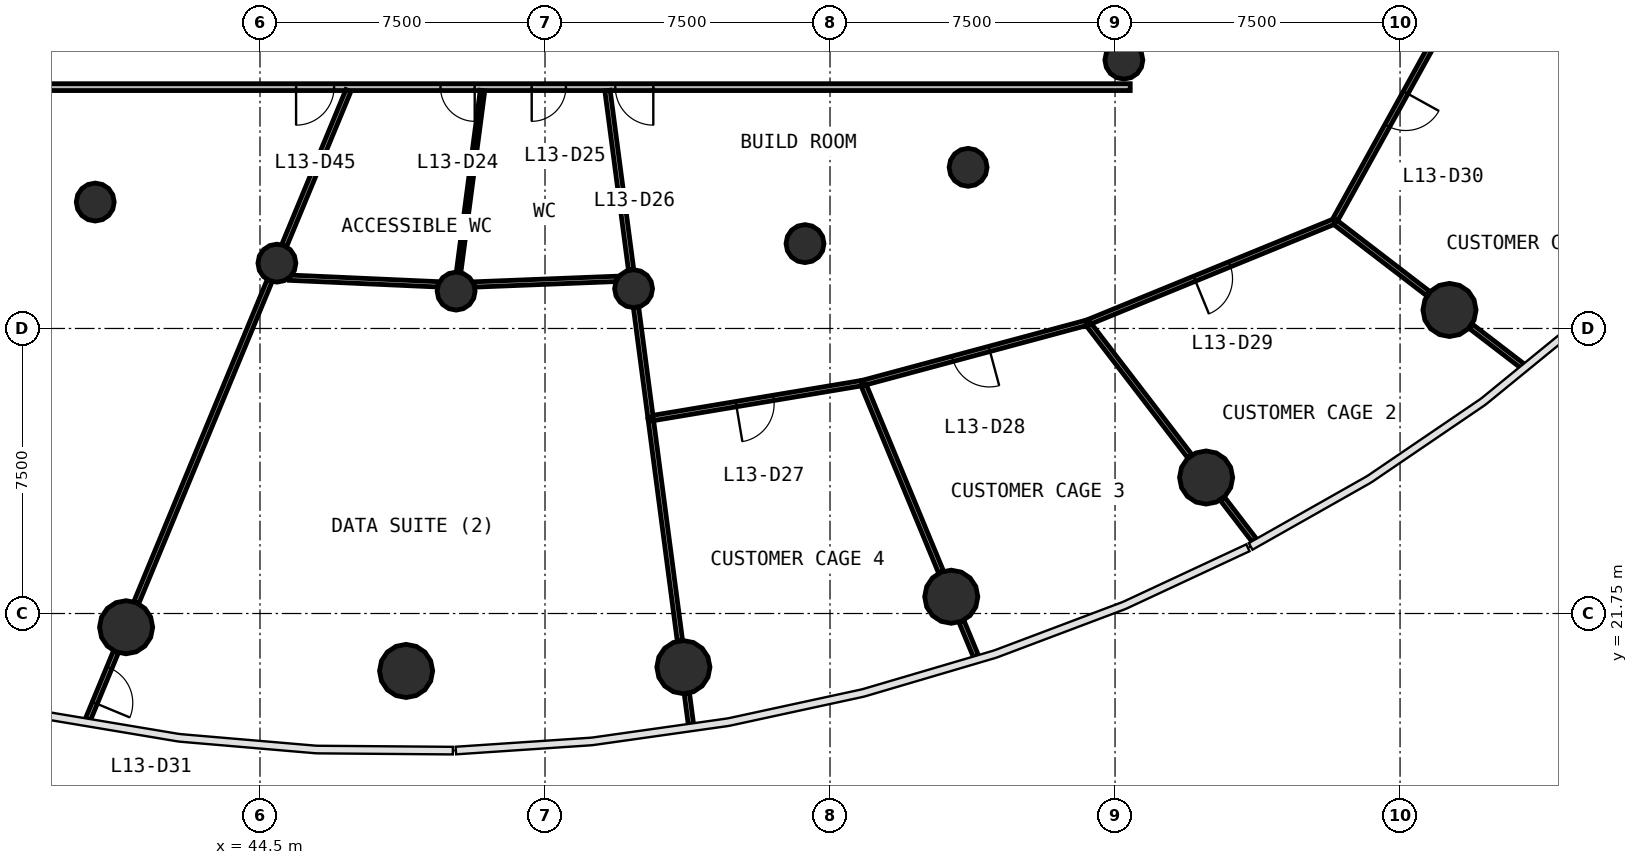
"""IFC4 building model, lengths in metres.
Left out: names, types, materials, properties, quantities, classifications, styles, units other than length and angle.
Written with IfcOpenShell. Run it as: python <this file> out.ifc"""

import sys

from ifc_helpers import new_model, si_unit, direction, frame, frame_2d, origin, origin_2d, place, context, subcontext, project, spatial, rectangle, circle, extrude, source, transform, mapped, element, fill, save


model = new_model("IFC4")
c1 = context("Model", 3, precision=1e-05, world=origin(), true_north=direction((0.0, 1.0)))
c2 = subcontext(c1, "Body", "Model", "MODEL_VIEW")
j1 = project(units=[si_unit("LENGTHUNIT", "METRE"), si_unit("PLANEANGLEUNIT", "RADIAN")], contexts=[c1])
p1 = place(None, origin())
s1 = spatial("IfcSite", under=j1, at=p1, CompositionType="ELEMENT")
p2 = place(p1, origin())
s2 = spatial("IfcBuilding", under=s1, at=p2, CompositionType="ELEMENT")
p3 = place(p2, frame((0.0, 0.0, 57.8)))
s3 = spatial("IfcBuildingStorey", under=s2, at=p3, CompositionType="ELEMENT", Elevation=57.8)
m1 = source(origin(), c2, "Body", "SweptSolid", [
    extrude(circle(Radius=0.7, at=origin_2d()), origin(), (0.0, 0.0, 1.0), 4.4),
])
for number, where, z_axis, x_axis in (
    (1, (40.977, 21.389, 0.0), (0.0, 0.0, 1.0), (1.0, 0.0, 0.0)),
    (2, (48.345, 20.239, 0.0), (0.0, 0.0, 1.0), (1.0, 0.0, 0.0)),
    (3, (55.642, 20.339, 0.0), (0.0, 0.0, 1.0), (1.0, 0.0, 0.0)),
    (4, (62.69, 22.191, 0.0), (0.0, 0.0, 1.0), (1.0, 0.0, 0.0)),
    (5, (69.396, 25.328, 0.0), (0.0, 0.0, 1.0), (1.0, 0.0, 0.0)),
    (6, (75.801, 29.737, 0.0), (0.0, 0.0, 1.0), (1.0, 0.0, 0.0)),
):
    element("IfcColumn", number, at=place(p3, frame(where, z_axis=z_axis, x_axis=x_axis)), inside=s3, PredefinedType="COLUMN", context=c2, shape_type="MappedRepresentation", body=[
        mapped(m1, transform((0.0, 0.0, 0.0), scale=1.0)),
    ])
m2 = source(origin(), c2, "Body", "SweptSolid", [
    extrude(circle(Radius=0.5, at=origin_2d()), origin(), (0.0, 0.0, 1.0), 4.4),
])
for number, where, z_axis, x_axis in (
    (7, (40.165, 32.576, 0.0), (0.0, 0.0, 1.0), (1.0, 0.0, 0.0)),
    (8, (44.945, 30.969, 0.0), (0.0, 0.0, 1.0), (1.0, 0.0, 0.0)),
    (9, (49.661, 30.233, 0.0), (0.0, 0.0, 1.0), (1.0, 0.0, 0.0)),
    (10, (54.331, 30.297, 0.0), (0.0, 0.0, 1.0), (1.0, 0.0, 0.0)),
    (11, (58.842, 31.482, 0.0), (0.0, 0.0, 1.0), (1.0, 0.0, 0.0)),
    (12, (63.134, 33.49, 0.0), (0.0, 0.0, 1.0), (1.0, 0.0, 0.0)),
    (13, (67.232, 36.312, 0.0), (0.0, 0.0, 1.0), (1.0, 0.0, 0.0)),
):
    element("IfcColumn", number, at=place(p3, frame(where, z_axis=z_axis, x_axis=x_axis)), inside=s3, PredefinedType="COLUMN", context=c2, shape_type="MappedRepresentation", body=[
        mapped(m2, transform((0.0, 0.0, 0.0), scale=1.0)),
    ])
p4 = place(p3, frame((67.4, 35.6, 0.0), z_axis=(0.0, 0.0, 1.0), x_axis=(-1.0, 0.0, 0.0)))
e14 = element("IfcWall", 14, at=p4, inside=s3, PredefinedType="PARTITIONING", context=c2, shape_type="SweptSolid", body=[
    extrude(rectangle(XDim=30.8, YDim=0.18, at=frame_2d((15.4, 0.0))), origin(), (0.0, 0.0, 1.0), 3.05),
])
p5 = place(p4, frame((17.25, 0.0, 0.0)))
e15 = element("IfcOpeningElement", 15, at=p5, cuts=e14, PredefinedType="OPENING", context=c2, shape_type="SweptSolid", body=[
    extrude(rectangle(XDim=0.9, YDim=2.1, at=frame_2d((0.45, 1.05))), frame((0.0, 0.1, 0.0), z_axis=(0.0, -1.0, 0.0), x_axis=(1.0, 0.0, 0.0)), (0.0, 0.0, 1.0), 0.2),
])
p6 = place(p4, frame((14.85, 0.0, 0.0)))
e16 = element("IfcOpeningElement", 16, at=p6, cuts=e14, PredefinedType="OPENING", context=c2, shape_type="SweptSolid", body=[
    extrude(rectangle(XDim=0.9, YDim=2.1, at=frame_2d((0.45, 1.05))), frame((0.0, 0.1, 0.0), z_axis=(0.0, -1.0, 0.0), x_axis=(1.0, 0.0, 0.0)), (0.0, 0.0, 1.0), 0.2),
])
p7 = place(p4, frame((12.55, 0.0, 0.0)))
e17 = element("IfcOpeningElement", 17, at=p7, cuts=e14, PredefinedType="OPENING", context=c2, shape_type="SweptSolid", body=[
    extrude(rectangle(XDim=1.0, YDim=2.1, at=frame_2d((0.5, 1.05))), frame((0.0, 0.1, 0.0), z_axis=(0.0, -1.0, 0.0), x_axis=(1.0, 0.0, 0.0)), (0.0, 0.0, 1.0), 0.2),
])
p8 = place(p4, frame((20.95, 0.0, 0.0)))
e18 = element("IfcOpeningElement", 18, at=p8, cuts=e14, PredefinedType="OPENING", context=c2, shape_type="SweptSolid", body=[
    extrude(rectangle(XDim=1.0, YDim=2.1, at=frame_2d((0.5, 1.05))), frame((0.0, 0.1, 0.0), z_axis=(0.0, -1.0, 0.0), x_axis=(1.0, 0.0, 0.0)), (0.0, 0.0, 1.0), 0.2),
])
p9 = place(p3, frame((44.752, 30.502, 0.0), z_axis=(0.0, 0.0, 1.0), x_axis=(-0.382672728165, -0.923883966264, 0.0)))
e19 = element("IfcWall", 19, at=p9, inside=s3, PredefinedType="PARTITIONING", context=c2, shape_type="SweptSolid", body=[
    extrude(rectangle(XDim=9.16, YDim=0.14, at=frame_2d((4.58, 0.0))), origin(), (0.0, 0.0, 1.0), 3.05),
])
p10 = place(p3, frame((72.768, 32.064, 0.0), z_axis=(0.0, 0.0, 1.0), x_axis=(-0.925503200364, -0.378739786814, 0.0)))
e20 = element("IfcWall", 20, at=p10, inside=s3, PredefinedType="PARTITIONING", context=c2, shape_type="SweptSolid", body=[
    extrude(rectangle(XDim=7.022, YDim=0.14, at=frame_2d((3.511, 0.0))), origin(), (0.0, 0.0, 1.0), 3.05),
])
p11 = place(p10, frame((2.972, 0.0, 0.0)))
e21 = element("IfcOpeningElement", 21, at=p11, cuts=e20, PredefinedType="OPENING", context=c2, shape_type="SweptSolid", body=[
    extrude(rectangle(XDim=1.0, YDim=2.1, at=frame_2d((0.5, 1.05))), frame((0.0, 0.08, 0.0), z_axis=(0.0, -1.0, 0.0), x_axis=(1.0, 0.0, 0.0)), (0.0, 0.0, 1.0), 0.16),
])
p12 = place(p3, frame((76.071, 38.029, 0.0), z_axis=(0.0, 0.0, 1.0), x_axis=(-0.484378309165, -0.874858647788, 0.0)))
e22 = element("IfcWall", 22, at=p12, inside=s3, PredefinedType="PARTITIONING", context=c2, shape_type="SweptSolid", body=[
    extrude(rectangle(XDim=6.789, YDim=0.14, at=frame_2d((3.395, 0.0))), origin(), (0.0, 0.0, 1.0), 3.05),
])
p13 = place(p12, frame((2.939, 0.0, 0.0)))
e23 = element("IfcOpeningElement", 23, at=p13, cuts=e22, PredefinedType="OPENING", context=c2, shape_type="SweptSolid", body=[
    extrude(rectangle(XDim=1.0, YDim=2.1, at=frame_2d((0.5, 1.05))), frame((0.0, 0.08, 0.0), z_axis=(0.0, -1.0, 0.0), x_axis=(1.0, 0.0, 0.0)), (0.0, 0.0, 1.0), 0.16),
])
p14 = place(p3, frame((66.24, 29.396, 0.0), z_axis=(0.0, 0.0, 1.0), x_axis=(-0.965712487128, -0.259613929145, 0.0)))
e24 = element("IfcWall", 24, at=p14, inside=s3, PredefinedType="PARTITIONING", context=c2, shape_type="SweptSolid", body=[
    extrude(rectangle(XDim=6.088, YDim=0.14, at=frame_2d((3.044, 0.0))), origin(), (0.0, 0.0, 1.0), 3.05),
])
p15 = place(p14, frame((2.638, 0.0, 0.0)))
e25 = element("IfcOpeningElement", 25, at=p15, cuts=e24, PredefinedType="OPENING", context=c2, shape_type="SweptSolid", body=[
    extrude(rectangle(XDim=1.0, YDim=2.1, at=frame_2d((0.5, 1.05))), frame((0.0, 0.08, 0.0), z_axis=(0.0, -1.0, 0.0), x_axis=(1.0, 0.0, 0.0)), (0.0, 0.0, 1.0), 0.16),
])
p16 = place(p3, frame((54.78, 26.883, 0.0), z_axis=(0.0, 0.0, 1.0), x_axis=(0.130539118961, -0.99144315945, 0.0)))
e26 = element("IfcWall", 26, at=p16, inside=s3, PredefinedType="PARTITIONING", context=c2, shape_type="SweptSolid", body=[
    extrude(rectangle(XDim=5.897, YDim=0.14, at=frame_2d((2.948, 0.0))), origin(), (0.0, 0.0, 1.0), 3.05),
])
p17 = place(p3, frame((60.331, 27.811, 0.0), z_axis=(0.0, 0.0, 1.0), x_axis=(-0.986324289368, -0.164816249813, 0.0)))
e27 = element("IfcWall", 27, at=p17, inside=s3, PredefinedType="PARTITIONING", context=c2, shape_type="SweptSolid", body=[
    extrude(rectangle(XDim=5.598, YDim=0.14, at=frame_2d((2.799, 0.0))), origin(), (0.0, 0.0, 1.0), 3.05),
])
p18 = place(p17, frame((2.348, 0.0, 0.0)))
e28 = element("IfcOpeningElement", 28, at=p18, cuts=e27, PredefinedType="OPENING", context=c2, shape_type="SweptSolid", body=[
    extrude(rectangle(XDim=1.0, YDim=2.1, at=frame_2d((0.5, 1.05))), frame((0.0, 0.08, 0.0), z_axis=(0.0, -1.0, 0.0), x_axis=(1.0, 0.0, 0.0)), (0.0, 0.0, 1.0), 0.16),
])
p19 = place(p3, frame((60.387, 27.751, 0.0), z_axis=(0.0, 0.0, 1.0), x_axis=(0.38268597253, -0.923878480337, 0.0)))
e29 = element("IfcWall", 29, at=p19, inside=s3, PredefinedType="PARTITIONING", context=c2, shape_type="SweptSolid", body=[
    extrude(rectangle(XDim=5.312, YDim=0.14, at=frame_2d((2.656, 0.0))), origin(), (0.0, 0.0, 1.0), 3.05),
])
p20 = place(p3, frame((76.099, 38.018, 0.0), z_axis=(0.0, 0.0, 1.0), x_axis=(0.923875284448, -0.382693687936, 0.0)))
e30 = element("IfcWall", 30, at=p20, inside=s3, PredefinedType="PARTITIONING", context=c2, shape_type="SweptSolid", body=[
    extrude(rectangle(XDim=5.298, YDim=0.14, at=frame_2d((2.649, 0.0))), origin(), (0.0, 0.0, 1.0), 3.05),
])
p21 = place(p3, frame((53.644, 35.51, 0.0), z_axis=(0.0, 0.0, 1.0), x_axis=(0.130548834981, -0.991441880135, 0.0)))
e31 = element("IfcWall", 31, at=p21, inside=s3, PredefinedType="PARTITIONING", context=c2, shape_type="SweptSolid", body=[
    extrude(rectangle(XDim=4.754, YDim=0.14, at=frame_2d((2.377, 0.0))), origin(), (0.0, 0.0, 1.0), 3.05),
])
p22 = place(p3, frame((46.826, 35.51, 0.0), z_axis=(0.0, 0.0, 1.0), x_axis=(-0.382672831764, -0.923883923353, 0.0)))
e32 = element("IfcWall", 32, at=p22, inside=s3, PredefinedType="PARTITIONING", context=c2, shape_type="SweptSolid", body=[
    extrude(rectangle(XDim=4.41, YDim=0.14, at=frame_2d((2.205, 0.0))), origin(), (0.0, 0.0, 1.0), 3.05),
])
p23 = place(p3, frame((66.313, 29.347, 0.0), z_axis=(0.0, 0.0, 1.0), x_axis=(0.608768802399, -0.793347682435, 0.0)))
e33 = element("IfcWall", 33, at=p23, inside=s3, PredefinedType="PARTITIONING", context=c2, shape_type="SweptSolid", body=[
    extrude(rectangle(XDim=4.361, YDim=0.14, at=frame_2d((2.18, 0.0))), origin(), (0.0, 0.0, 1.0), 3.05),
])
p24 = place(p3, frame((45.275, 30.586, 0.0), z_axis=(0.0, 0.0, 1.0), x_axis=(0.999004449327, -0.044610651473, 0.0)))
e34 = element("IfcWall", 34, at=p24, inside=s3, PredefinedType="PARTITIONING", context=c2, shape_type="SweptSolid", body=[
    extrude(rectangle(XDim=3.918, YDim=0.14, at=frame_2d((1.959, 0.0))), origin(), (0.0, 0.0, 1.0), 3.05),
])
p25 = place(p3, frame((50.134, 30.407, 0.0), z_axis=(0.0, 0.0, 1.0), x_axis=(0.999223066678, 0.039411457966, 0.0)))
e35 = element("IfcWall", 35, at=p25, inside=s3, PredefinedType="PARTITIONING", context=c2, shape_type="SweptSolid", body=[
    extrude(rectangle(XDim=3.766, YDim=0.14, at=frame_2d((1.883, 0.0))), origin(), (0.0, 0.0, 1.0), 3.05),
])
p26 = place(p3, frame((72.792, 32.046, 0.0), z_axis=(0.0, 0.0, 1.0), x_axis=(0.793358163661, -0.608755143019, 0.0)))
e36 = element("IfcWall", 36, at=p26, inside=s3, PredefinedType="PARTITIONING", context=c2, shape_type="SweptSolid", body=[
    extrude(rectangle(XDim=3.088, YDim=0.14, at=frame_2d((1.544, 0.0))), origin(), (0.0, 0.0, 1.0), 3.05),
])
p27 = place(p3, frame((54.396, 29.797, 0.0), z_axis=(0.0, 0.0, 1.0), x_axis=(0.130530511821, -0.991444292678, 0.0)))
e37 = element("IfcWall", 37, at=p27, inside=s3, PredefinedType="PARTITIONING", context=c2, shape_type="SweptSolid", body=[
    extrude(rectangle(XDim=2.908, YDim=0.14, at=frame_2d((1.454, 0.0))), origin(), (0.0, 0.0, 1.0), 3.05),
])
p28 = place(p3, frame((40.708, 20.737, 0.0), z_axis=(0.0, 0.0, 1.0), x_axis=(-0.382669186211, -0.923885433333, 0.0)))
e38 = element("IfcWall", 38, at=p28, inside=s3, PredefinedType="PARTITIONING", context=c2, shape_type="SweptSolid", body=[
    extrude(rectangle(XDim=1.925, YDim=0.14, at=frame_2d((0.962, 0.0))), origin(), (0.0, 0.0, 1.0), 3.05),
])
p29 = place(p28, frame((0.45, 0.0, 0.0)))
e39 = element("IfcOpeningElement", 39, at=p29, cuts=e38, PredefinedType="OPENING", context=c2, shape_type="SweptSolid", body=[
    extrude(rectangle(XDim=1.0, YDim=2.1, at=frame_2d((0.5, 1.05))), frame((0.0, 0.08, 0.0), z_axis=(0.0, -1.0, 0.0), x_axis=(1.0, 0.0, 0.0)), (0.0, 0.0, 1.0), 0.16),
])
p30 = place(p3, frame((76.359, 29.309, 0.0), z_axis=(0.0, 0.0, 1.0), x_axis=(0.793288592826, -0.608845800258, 0.0)))
e40 = element("IfcWall", 40, at=p30, inside=s3, PredefinedType="PARTITIONING", context=c2, shape_type="SweptSolid", body=[
    extrude(rectangle(XDim=1.719, YDim=0.14, at=frame_2d((0.86, 0.0))), origin(), (0.0, 0.0, 1.0), 3.05),
])
p31 = place(p3, frame((69.825, 24.77, 0.0), z_axis=(0.0, 0.0, 1.0), x_axis=(0.608933775349, -0.793221064546, 0.0)))
e41 = element("IfcWall", 41, at=p31, inside=s3, PredefinedType="PARTITIONING", context=c2, shape_type="SweptSolid", body=[
    extrude(rectangle(XDim=1.367, YDim=0.14, at=frame_2d((0.684, 0.0))), origin(), (0.0, 0.0, 1.0), 3.05),
])
p32 = place(p3, frame((62.96, 21.54, 0.0), z_axis=(0.0, 0.0, 1.0), x_axis=(0.382570916395, -0.923926130126, 0.0)))
e42 = element("IfcWall", 42, at=p32, inside=s3, PredefinedType="PARTITIONING", context=c2, shape_type="SweptSolid", body=[
    extrude(rectangle(XDim=0.984, YDim=0.14, at=frame_2d((0.492, 0.0))), origin(), (0.0, 0.0, 1.0), 3.05),
])
p33 = place(p3, frame((55.734, 19.64, 0.0), z_axis=(0.0, 0.0, 1.0), x_axis=(0.130524691554, -0.991445058939, 0.0)))
e43 = element("IfcWall", 43, at=p33, inside=s3, PredefinedType="PARTITIONING", context=c2, shape_type="SweptSolid", body=[
    extrude(rectangle(XDim=0.81, YDim=0.14, at=frame_2d((0.405, 0.0))), origin(), (0.0, 0.0, 1.0), 3.05),
])
p34 = place(p3, frame((50.356, 35.51, 0.0), z_axis=(0.0, 0.0, 1.0), x_axis=(-0.130523979823, -0.991445152639, 0.0)))
e44 = element("IfcWall", 44, at=p34, inside=s3, PredefinedType="PARTITIONING", context=c2, shape_type="SweptSolid", body=[
    extrude(rectangle(XDim=4.818, YDim=0.12, at=frame_2d((2.409, 0.0))), origin(), (0.0, 0.0, 1.0), 3.05),
])
m3 = source(origin(), c2, "Body", "SweptSolid", [
    extrude(rectangle(XDim=0.9, YDim=2.1, at=frame_2d((0.45, 1.05))), frame((0.0, 0.025, 0.0), z_axis=(0.0, -1.0, 0.0), x_axis=(1.0, 0.0, 0.0)), (0.0, 0.0, 1.0), 0.05),
])
p35 = place(p5, origin())
e45 = element("IfcDoor", 45, at=p35, inside=s3, OperationType="SINGLE_SWING_LEFT", PredefinedType="DOOR", context=c2, shape_type="MappedRepresentation", body=[
    mapped(m3, transform((0.0, 0.0, 0.0), scale=1.0)),
])
fill(e15, e45)
p36 = place(p6, origin())
e46 = element("IfcDoor", 46, at=p36, inside=s3, OperationType="SINGLE_SWING_RIGHT", PredefinedType="DOOR", context=c2, shape_type="MappedRepresentation", body=[
    mapped(m3, transform((0.0, 0.0, 0.0), scale=1.0)),
])
fill(e16, e46)
m4 = source(origin(), c2, "Body", "SweptSolid", [
    extrude(rectangle(XDim=1.0, YDim=2.1, at=frame_2d((0.5, 1.05))), frame((0.0, 0.025, 0.0), z_axis=(0.0, -1.0, 0.0), x_axis=(1.0, 0.0, 0.0)), (0.0, 0.0, 1.0), 0.05),
])
p37 = place(p7, origin())
e47 = element("IfcDoor", 47, at=p37, inside=s3, OperationType="SINGLE_SWING_LEFT", PredefinedType="DOOR", context=c2, shape_type="MappedRepresentation", body=[
    mapped(m4, transform((0.0, 0.0, 0.0), scale=1.0)),
])
fill(e17, e47)
p38 = place(p18, origin())
e48 = element("IfcDoor", 48, at=p38, inside=s3, OperationType="SINGLE_SWING_RIGHT", PredefinedType="DOOR", context=c2, shape_type="MappedRepresentation", body=[
    mapped(m4, transform((0.0, 0.0, 0.0), scale=1.0)),
])
fill(e28, e48)
p39 = place(p15, origin())
e49 = element("IfcDoor", 49, at=p39, inside=s3, OperationType="SINGLE_SWING_LEFT", PredefinedType="DOOR", context=c2, shape_type="MappedRepresentation", body=[
    mapped(m4, transform((0.0, 0.0, 0.0), scale=1.0)),
])
fill(e25, e49)
p40 = place(p11, origin())
e50 = element("IfcDoor", 50, at=p40, inside=s3, OperationType="SINGLE_SWING_RIGHT", PredefinedType="DOOR", context=c2, shape_type="MappedRepresentation", body=[
    mapped(m4, transform((0.0, 0.0, 0.0), scale=1.0)),
])
fill(e21, e50)
p41 = place(p13, origin())
e51 = element("IfcDoor", 51, at=p41, inside=s3, OperationType="SINGLE_SWING_LEFT", PredefinedType="DOOR", context=c2, shape_type="MappedRepresentation", body=[
    mapped(m4, transform((0.0, 0.0, 0.0), scale=1.0)),
])
fill(e23, e51)
p42 = place(p29, origin())
e52 = element("IfcDoor", 52, at=p42, inside=s3, OperationType="SINGLE_SWING_RIGHT", PredefinedType="DOOR", context=c2, shape_type="MappedRepresentation", body=[
    mapped(m4, transform((0.0, 0.0, 0.0), scale=1.0)),
])
fill(e39, e52)
p43 = place(p8, origin())
e53 = element("IfcDoor", 53, at=p43, inside=s3, OperationType="SINGLE_SWING_RIGHT", PredefinedType="DOOR", context=c2, shape_type="MappedRepresentation", body=[
    mapped(m4, transform((0.0, 0.0, 0.0), scale=1.0)),
])
fill(e18, e53)
save(model, sys.argv[1])
